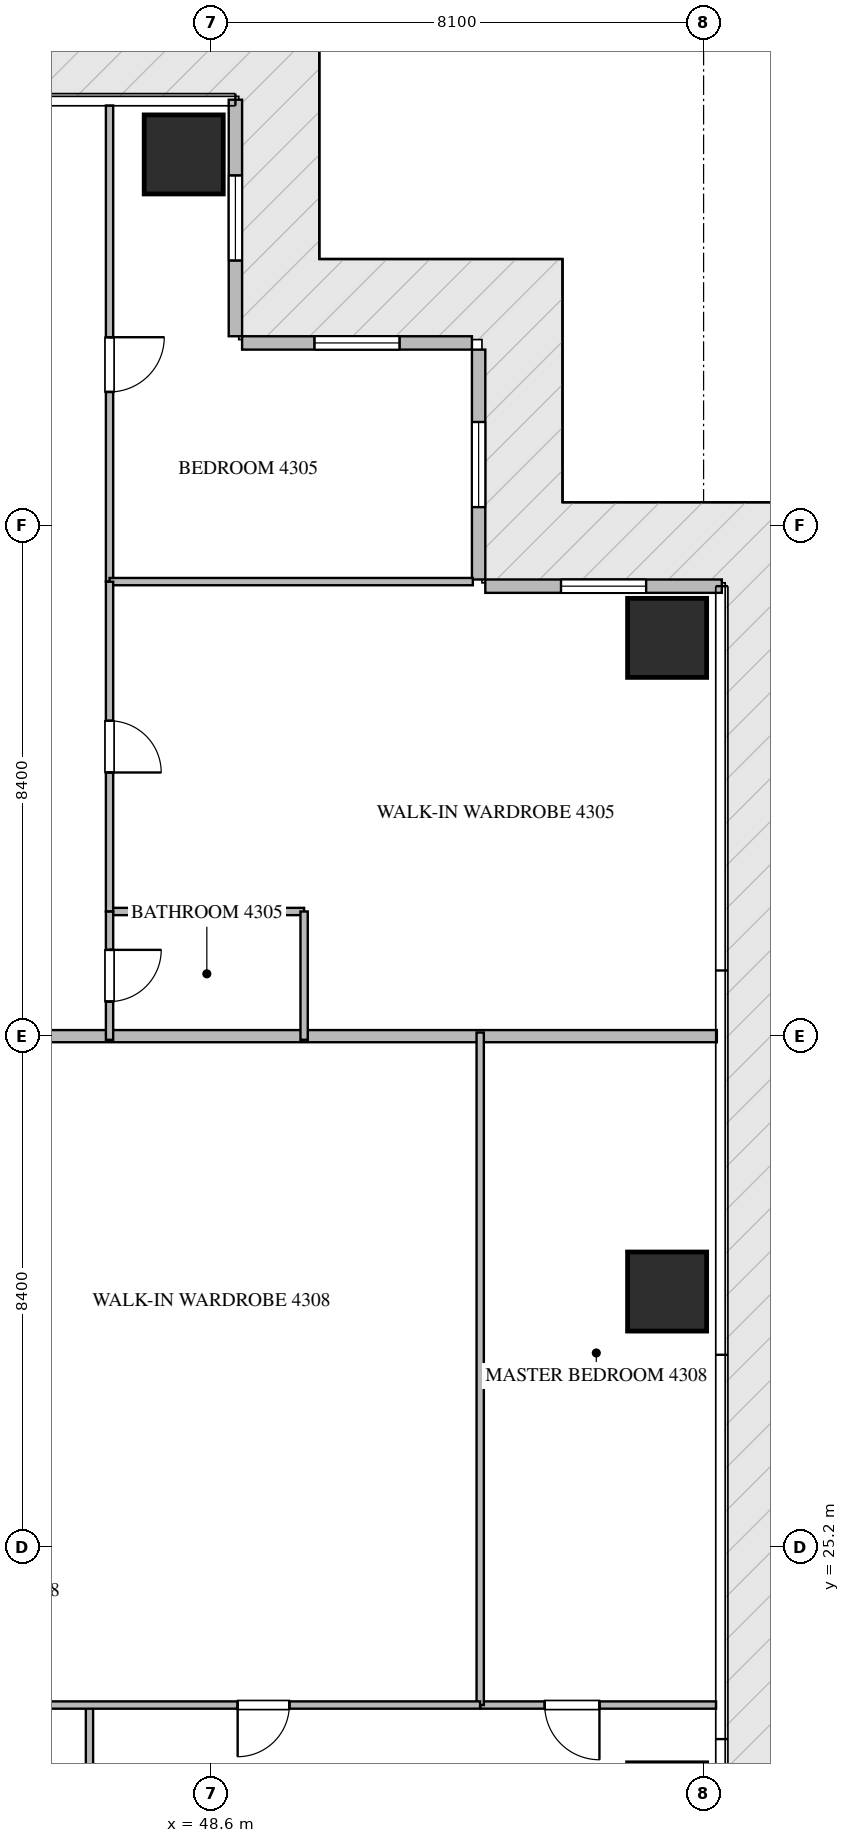
"""IFC4 building model, lengths in metres.
Left out: names, types, materials, properties, quantities, classifications, styles, units other than length and angle.
Written with IfcOpenShell. Run it as: python <this file> out.ifc"""

import sys

from ifc_helpers import new_model, si_unit, direction, frame, frame_2d, origin, origin_2d, place, context, subcontext, project, spatial, rectangle, extrude, source, transform, mapped, element, fill, save


model = new_model("IFC4")
c1 = context("Model", 3, precision=1e-05, world=origin(), true_north=direction((0.0, 1.0)))
c2 = subcontext(c1, "Body", "Model", "MODEL_VIEW")
j1 = project(units=[si_unit("LENGTHUNIT", "METRE"), si_unit("PLANEANGLEUNIT", "RADIAN")], contexts=[c1])
p1 = place(None, origin())
s1 = spatial("IfcSite", under=j1, at=p1, CompositionType="ELEMENT")
p2 = place(p1, origin())
s2 = spatial("IfcBuilding", under=s1, at=p2, CompositionType="ELEMENT")
p3 = place(p2, frame((0.0, 0.0, 172.65)))
s3 = spatial("IfcBuildingStorey", under=s2, at=p3, CompositionType="ELEMENT", Elevation=172.65)
m1 = source(origin(), c2, "Body", "SweptSolid", [
    extrude(rectangle(XDim=1.3, YDim=1.3, at=origin_2d()), origin(), (0.0, 0.0, 1.0), 3.75),
])
for number, where, z_axis, x_axis in (
    (1, (48.15, 48.1, -0.26), (0.0, 0.0, 1.0), (1.0, 0.0, 0.0)),
    (2, (56.1, 29.4, -0.26), (0.0, 0.0, 1.0), (1.0, 0.0, 0.0)),
    (3, (56.1, 40.15, -0.26), (0.0, 0.0, 1.0), (1.0, 0.0, 0.0)),
):
    element("IfcColumn", number, at=place(p3, frame(where, z_axis=z_axis, x_axis=x_axis)), inside=s3, PredefinedType="COLUMN", context=c2, shape_type="MappedRepresentation", body=[
        mapped(m1, transform((0.0, 0.0, 0.0), scale=1.0)),
    ])
p4 = place(p3, frame((57.0, 41.0, 0.0), z_axis=(0.0, 0.0, 1.0), x_axis=(-1.0, 0.0, 0.0)))
e4 = element("IfcWall", 4, at=p4, inside=s3, PredefinedType="ELEMENTEDWALL", context=c2, shape_type="SweptSolid", body=[
    extrude(rectangle(XDim=3.89, YDim=0.22, at=frame_2d((1.945, 0.0))), origin(), (0.0, 0.0, 1.0), 3.475),
])
p5 = place(p4, frame((1.245, 0.0, 0.65)))
e5 = element("IfcOpeningElement", 5, at=p5, cuts=e4, PredefinedType="OPENING", context=c2, shape_type="SweptSolid", body=[
    extrude(rectangle(XDim=1.4, YDim=2.05, at=frame_2d((0.7, 1.025))), frame((0.0, 0.12, 0.0), z_axis=(0.0, -1.0, 0.0), x_axis=(1.0, 0.0, 0.0)), (0.0, 0.0, 1.0), 0.24),
])
p6 = place(p3, frame((53.0, 41.11, 0.0), z_axis=(0.0, 0.0, 1.0), x_axis=(0.0, 1.0, 0.0)))
e6 = element("IfcWall", 6, at=p6, inside=s3, PredefinedType="ELEMENTEDWALL", context=c2, shape_type="SweptSolid", body=[
    extrude(rectangle(XDim=3.78, YDim=0.22, at=frame_2d((1.89, 0.0))), origin(), (0.0, 0.0, 1.0), 3.475),
])
p7 = place(p6, frame((1.19, 0.0, 0.65)))
e7 = element("IfcOpeningElement", 7, at=p7, cuts=e6, PredefinedType="OPENING", context=c2, shape_type="SweptSolid", body=[
    extrude(rectangle(XDim=1.4, YDim=2.05, at=frame_2d((0.7, 1.025))), frame((0.0, 0.12, 0.0), z_axis=(0.0, -1.0, 0.0), x_axis=(1.0, 0.0, 0.0)), (0.0, 0.0, 1.0), 0.24),
])
p8 = place(p3, frame((52.89, 45.0, 0.0), z_axis=(0.0, 0.0, 1.0), x_axis=(-1.0, 0.0, 0.0)))
e8 = element("IfcWall", 8, at=p8, inside=s3, PredefinedType="ELEMENTEDWALL", context=c2, shape_type="SweptSolid", body=[
    extrude(rectangle(XDim=3.78, YDim=0.22, at=frame_2d((1.89, 0.0))), origin(), (0.0, 0.0, 1.0), 3.475),
])
p9 = place(p8, frame((1.19, 0.0, 0.65)))
e9 = element("IfcOpeningElement", 9, at=p9, cuts=e8, PredefinedType="OPENING", context=c2, shape_type="SweptSolid", body=[
    extrude(rectangle(XDim=1.4, YDim=2.05, at=frame_2d((0.7, 1.025))), frame((0.0, 0.12, 0.0), z_axis=(0.0, -1.0, 0.0), x_axis=(1.0, 0.0, 0.0)), (0.0, 0.0, 1.0), 0.24),
])
p10 = place(p3, frame((49.0, 45.11, 0.0), z_axis=(0.0, 0.0, 1.0), x_axis=(0.0, 1.0, 0.0)))
e10 = element("IfcWall", 10, at=p10, inside=s3, PredefinedType="ELEMENTEDWALL", context=c2, shape_type="SweptSolid", body=[
    extrude(rectangle(XDim=3.89, YDim=0.22, at=frame_2d((1.945, 0.0))), origin(), (0.0, 0.0, 1.0), 3.475),
])
p11 = place(p10, frame((1.245, 0.0, 0.65)))
e11 = element("IfcOpeningElement", 11, at=p11, cuts=e10, PredefinedType="OPENING", context=c2, shape_type="SweptSolid", body=[
    extrude(rectangle(XDim=1.4, YDim=2.05, at=frame_2d((0.7, 1.025))), frame((0.0, 0.12, 0.0), z_axis=(0.0, -1.0, 0.0), x_axis=(1.0, 0.0, 0.0)), (0.0, 0.0, 1.0), 0.24),
])
p12 = place(p3, frame((43.85, 33.6, 0.0), z_axis=(0.0, 0.0, 1.0), x_axis=(1.0, 0.0, 0.0)))
e12 = element("IfcWall", 12, at=p12, inside=s3, PredefinedType="PARTITIONING", context=c2, shape_type="SweptSolid", body=[
    extrude(rectangle(XDim=13.068, YDim=0.2, at=frame_2d((6.534, 0.0))), origin(), (0.0, 0.0, 1.0), 3.49),
])
p13 = place(p3, frame((46.93, 48.905, 0.0), z_axis=(0.0, 0.0, 1.0), x_axis=(0.0, -1.0, 0.0)))
e13 = element("IfcWall", 13, at=p13, inside=s3, PredefinedType="PARTITIONING", context=c2, shape_type="SweptSolid", body=[
    extrude(rectangle(XDim=7.83, YDim=0.12, at=frame_2d((3.915, 0.0))), origin(), (0.0, 0.0, 1.0), 3.49),
])
p14 = place(p13, frame((3.811, 0.0, 0.0)))
e14 = element("IfcOpeningElement", 14, at=p14, cuts=e13, PredefinedType="OPENING", context=c2, shape_type="SweptSolid", body=[
    extrude(rectangle(XDim=0.9, YDim=2.1, at=frame_2d((0.45, 1.05))), frame((0.0, 0.07, 0.0), z_axis=(0.0, -1.0, 0.0), x_axis=(1.0, 0.0, 0.0)), (0.0, 0.0, 1.0), 0.14),
])
p15 = place(p3, frame((46.93, 41.075, 0.0), z_axis=(0.0, 0.0, 1.0), x_axis=(1.0, 0.0, 0.0)))
e15 = element("IfcWall", 15, at=p15, inside=s3, PredefinedType="PARTITIONING", context=c2, shape_type="SweptSolid", body=[
    extrude(rectangle(XDim=5.975, YDim=0.12, at=frame_2d((2.988, 0.0))), origin(), (0.0, 0.0, 1.0), 3.49),
])
p16 = place(p3, frame((46.93, 35.65, 0.0), z_axis=(0.0, 0.0, 1.0), x_axis=(1.0, 0.0, 0.0)))
e16 = element("IfcWall", 16, at=p16, inside=s3, PredefinedType="PARTITIONING", context=c2, shape_type="SweptSolid", body=[
    extrude(rectangle(XDim=3.2, YDim=0.12, at=frame_2d((1.6, 0.0))), origin(), (0.0, 0.0, 1.0), 3.49),
])
p17 = place(p3, frame((50.13, 35.65, 0.0), z_axis=(0.0, 0.0, 1.0), x_axis=(0.0, -1.0, 0.0)))
e17 = element("IfcWall", 17, at=p17, inside=s3, PredefinedType="PARTITIONING", context=c2, shape_type="SweptSolid", body=[
    extrude(rectangle(XDim=2.11, YDim=0.12, at=frame_2d((1.055, 0.0))), origin(), (0.0, 0.0, 1.0), 3.49),
])
p18 = place(p3, frame((46.93, 41.073, 0.0), z_axis=(0.0, 0.0, 1.0), x_axis=(0.0, -1.0, 0.0)))
e18 = element("IfcWall", 18, at=p18, inside=s3, PredefinedType="PARTITIONING", context=c2, shape_type="SweptSolid", body=[
    extrude(rectangle(XDim=5.423, YDim=0.12, at=frame_2d((2.711, 0.0))), origin(), (0.0, 0.0, 1.0), 3.49),
])
p19 = place(p18, frame((2.287, 0.0, 0.0)))
e19 = element("IfcOpeningElement", 19, at=p19, cuts=e18, PredefinedType="OPENING", context=c2, shape_type="SweptSolid", body=[
    extrude(rectangle(XDim=0.85, YDim=2.1, at=frame_2d((0.425, 1.05))), frame((0.0, 0.07, 0.0), z_axis=(0.0, -1.0, 0.0), x_axis=(1.0, 0.0, 0.0)), (0.0, 0.0, 1.0), 0.14),
])
p20 = place(p3, frame((46.93, 35.648, 0.0), z_axis=(0.0, 0.0, 1.0), x_axis=(0.0, -1.0, 0.0)))
e20 = element("IfcWall", 20, at=p20, inside=s3, PredefinedType="PARTITIONING", context=c2, shape_type="SweptSolid", body=[
    extrude(rectangle(XDim=2.108, YDim=0.12, at=frame_2d((1.054, 0.0))), origin(), (0.0, 0.0, 1.0), 3.49),
])
p21 = place(p20, frame((0.629, 0.0, 0.0)))
e21 = element("IfcOpeningElement", 21, at=p21, cuts=e20, PredefinedType="OPENING", context=c2, shape_type="SweptSolid", body=[
    extrude(rectangle(XDim=0.85, YDim=2.1, at=frame_2d((0.425, 1.05))), frame((0.0, 0.07, 0.0), z_axis=(0.0, -1.0, 0.0), x_axis=(1.0, 0.0, 0.0)), (0.0, 0.0, 1.0), 0.14),
])
p22 = place(p3, frame((46.6, 19.4, 0.0), z_axis=(0.0, 0.0, 1.0), x_axis=(0.0, 1.0, 0.0)))
e22 = element("IfcWall", 22, at=p22, inside=s3, PredefinedType="PARTITIONING", context=c2, shape_type="SweptSolid", body=[
    extrude(rectangle(XDim=3.2, YDim=0.12, at=frame_2d((1.6, 0.0))), origin(), (0.0, 0.0, 1.0), 3.49),
])
p23 = place(p22, frame((1.175, 0.0, 0.0)))
e23 = element("IfcOpeningElement", 23, at=p23, cuts=e22, PredefinedType="OPENING", context=c2, shape_type="SweptSolid", body=[
    extrude(rectangle(XDim=0.85, YDim=2.1, at=frame_2d((0.425, 1.05))), frame((0.0, 0.07, 0.0), z_axis=(0.0, -1.0, 0.0), x_axis=(1.0, 0.0, 0.0)), (0.0, 0.0, 1.0), 0.14),
])
p24 = place(p3, frame((56.905, 22.6, 0.0), z_axis=(0.0, 0.0, 1.0), x_axis=(-1.0, 0.0, 0.0)))
e24 = element("IfcWall", 24, at=p24, inside=s3, PredefinedType="PARTITIONING", context=c2, shape_type="SweptSolid", body=[
    extrude(rectangle(XDim=3.879, YDim=0.12, at=frame_2d((1.939, 0.0))), origin(), (0.0, 0.0, 1.0), 3.49),
])
p25 = place(p24, frame((1.918, 0.0, 0.0)))
e25 = element("IfcOpeningElement", 25, at=p25, cuts=e24, PredefinedType="OPENING", context=c2, shape_type="SweptSolid", body=[
    extrude(rectangle(XDim=0.9, YDim=2.1, at=frame_2d((0.45, 1.05))), frame((0.0, 0.07, 0.0), z_axis=(0.0, -1.0, 0.0), x_axis=(1.0, 0.0, 0.0)), (0.0, 0.0, 1.0), 0.14),
])
p26 = place(p3, frame((53.026, 22.6, 0.0), z_axis=(0.0, 0.0, 1.0), x_axis=(0.0, 1.0, 0.0)))
e26 = element("IfcWall", 26, at=p26, inside=s3, PredefinedType="PARTITIONING", context=c2, shape_type="SweptSolid", body=[
    extrude(rectangle(XDim=11.06, YDim=0.12, at=frame_2d((5.53, 0.0))), origin(), (0.0, 0.0, 1.0), 3.49),
])
p27 = place(p3, frame((53.024, 22.6, 0.0), z_axis=(0.0, 0.0, 1.0), x_axis=(-1.0, 0.0, 0.0)))
e27 = element("IfcWall", 27, at=p27, inside=s3, PredefinedType="PARTITIONING", context=c2, shape_type="SweptSolid", body=[
    extrude(rectangle(XDim=7.124, YDim=0.12, at=frame_2d((3.562, 0.0))), origin(), (0.0, 0.0, 1.0), 3.49),
])
p28 = place(p27, frame((3.137, 0.0, 0.0)))
e28 = element("IfcOpeningElement", 28, at=p28, cuts=e27, PredefinedType="OPENING", context=c2, shape_type="SweptSolid", body=[
    extrude(rectangle(XDim=0.85, YDim=2.1, at=frame_2d((0.425, 1.05))), frame((0.0, 0.07, 0.0), z_axis=(0.0, -1.0, 0.0), x_axis=(1.0, 0.0, 0.0)), (0.0, 0.0, 1.0), 0.14),
])
m2 = source(origin(), c2, "Body", "SweptSolid", [
    extrude(rectangle(XDim=1.4, YDim=2.05, at=frame_2d((0.7, 1.025))), frame((0.0, 0.03, 0.0), z_axis=(0.0, -1.0, 0.0), x_axis=(1.0, 0.0, 0.0)), (0.0, 0.0, 1.0), 0.06),
])
p29 = place(p5, origin())
e29 = element("IfcWindow", 29, at=p29, inside=s3, PartitioningType="SINGLE_PANEL", PredefinedType="WINDOW", context=c2, shape_type="MappedRepresentation", body=[
    mapped(m2, transform((0.0, 0.0, 0.0), scale=1.0)),
])
fill(e5, e29)
p30 = place(p7, origin())
e30 = element("IfcWindow", 30, at=p30, inside=s3, PartitioningType="SINGLE_PANEL", PredefinedType="WINDOW", context=c2, shape_type="MappedRepresentation", body=[
    mapped(m2, transform((0.0, 0.0, 0.0), scale=1.0)),
])
fill(e7, e30)
p31 = place(p9, origin())
e31 = element("IfcWindow", 31, at=p31, inside=s3, PartitioningType="SINGLE_PANEL", PredefinedType="WINDOW", context=c2, shape_type="MappedRepresentation", body=[
    mapped(m2, transform((0.0, 0.0, 0.0), scale=1.0)),
])
fill(e9, e31)
p32 = place(p11, origin())
e32 = element("IfcWindow", 32, at=p32, inside=s3, PartitioningType="SINGLE_PANEL", PredefinedType="WINDOW", context=c2, shape_type="MappedRepresentation", body=[
    mapped(m2, transform((0.0, 0.0, 0.0), scale=1.0)),
])
fill(e11, e32)
m3 = source(origin(), c2, "Body", "SweptSolid", [
    extrude(rectangle(XDim=0.9, YDim=2.1, at=frame_2d((0.45, 1.05))), frame((0.0, 0.025, 0.0), z_axis=(0.0, -1.0, 0.0), x_axis=(1.0, 0.0, 0.0)), (0.0, 0.0, 1.0), 0.05),
])
p33 = place(p14, origin())
e33 = element("IfcDoor", 33, at=p33, inside=s3, OperationType="SINGLE_SWING_LEFT", PredefinedType="DOOR", context=c2, shape_type="MappedRepresentation", body=[
    mapped(m3, transform((0.0, 0.0, 0.0), scale=1.0)),
])
fill(e14, e33)
m4 = source(origin(), c2, "Body", "SweptSolid", [
    extrude(rectangle(XDim=0.85, YDim=2.1, at=frame_2d((0.425, 1.05))), frame((0.0, 0.025, 0.0), z_axis=(0.0, -1.0, 0.0), x_axis=(1.0, 0.0, 0.0)), (0.0, 0.0, 1.0), 0.05),
])
p34 = place(p19, origin())
e34 = element("IfcDoor", 34, at=p34, inside=s3, OperationType="SINGLE_SWING_RIGHT", PredefinedType="DOOR", context=c2, shape_type="MappedRepresentation", body=[
    mapped(m4, transform((0.0, 0.0, 0.0), scale=1.0)),
])
fill(e19, e34)
p35 = place(p21, origin())
e35 = element("IfcDoor", 35, at=p35, inside=s3, OperationType="SINGLE_SWING_LEFT", PredefinedType="DOOR", context=c2, shape_type="MappedRepresentation", body=[
    mapped(m4, transform((0.0, 0.0, 0.0), scale=1.0)),
])
fill(e21, e35)
p36 = place(p25, origin())
e36 = element("IfcDoor", 36, at=p36, inside=s3, OperationType="SINGLE_SWING_LEFT", PredefinedType="DOOR", context=c2, shape_type="MappedRepresentation", body=[
    mapped(m3, transform((0.0, 0.0, 0.0), scale=1.0)),
])
fill(e25, e36)
p37 = place(p28, origin())
e37 = element("IfcDoor", 37, at=p37, inside=s3, OperationType="SINGLE_SWING_RIGHT", PredefinedType="DOOR", context=c2, shape_type="MappedRepresentation", body=[
    mapped(m4, transform((0.0, 0.0, 0.0), scale=1.0)),
])
fill(e28, e37)
save(model, sys.argv[1])
